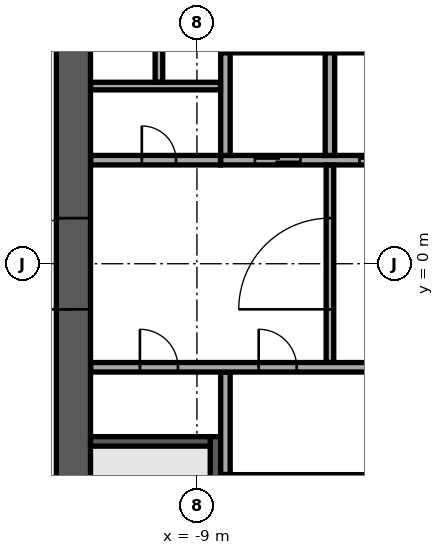
"""IFC4 building model, lengths in metres.
Left out: names, types, materials, properties, quantities, classifications, styles, units other than length and angle.
Written with IfcOpenShell. Run it as: python <this file> out.ifc"""

import sys

from ifc_helpers import new_model, si_unit, direction, frame, frame_2d, origin, place, context, subcontext, project, spatial, rectangle, extrude, element, fill, save


model = new_model("IFC4")
c1 = context("Model", 3, precision=1e-05, world=origin(), true_north=direction((0.0, 1.0)))
c2 = subcontext(c1, "Body", "Model", "MODEL_VIEW")
j1 = project(units=[si_unit("LENGTHUNIT", "METRE"), si_unit("PLANEANGLEUNIT", "RADIAN")], contexts=[c1])
p1 = place(None, origin())
s1 = spatial("IfcSite", under=j1, at=p1, CompositionType="ELEMENT")
p2 = place(p1, origin())
s2 = spatial("IfcBuilding", under=s1, at=p2, CompositionType="ELEMENT")
p3 = place(p2, frame((0.0, 0.0, 193.3)))
s3 = spatial("IfcBuildingStorey", under=s2, at=p3, CompositionType="ELEMENT", Elevation=193.3)
p4 = place(p3, frame((-12.25, -11.8, 0.0), z_axis=(0.0, 0.0, 1.0), x_axis=(0.0, 1.0, 0.0)))
e1 = element("IfcWall", 1, at=p4, inside=s3, PredefinedType="SHEAR", context=c2, shape_type="SweptSolid", body=[
    extrude(rectangle(XDim=23.6, YDim=0.9, at=frame_2d((11.8, 0.0))), origin(), (0.0, 0.0, 1.0), 3.62),
])
p5 = place(p4, frame((10.6, 0.0, 0.0)))
e2 = element("IfcOpeningElement", 2, at=p5, cuts=e1, PredefinedType="OPENING", context=c2, shape_type="SweptSolid", body=[
    extrude(rectangle(XDim=2.4, YDim=2.4, at=frame_2d((1.2, 1.2))), frame((0.0, 0.46, 0.0), z_axis=(0.0, -1.0, 0.0), x_axis=(1.0, 0.0, 0.0)), (0.0, 0.0, 1.0), 0.92),
])
p6 = place(p3, frame((-8.375, 5.7, 0.0), z_axis=(0.0, 0.0, 1.0), x_axis=(1.0, 0.0, 0.0)))
e3 = element("IfcWall", 3, at=p6, inside=s3, PredefinedType="SOLIDWALL", context=c2, shape_type="SweptSolid", body=[
    extrude(rectangle(XDim=16.75, YDim=0.3, at=frame_2d((8.375, 0.0))), origin(), (0.0, 0.0, 1.0), 3.62),
])
p7 = place(p3, frame((-8.375, 2.725, 0.0), z_axis=(0.0, 0.0, 1.0), x_axis=(1.0, 0.0, 0.0)))
e4 = element("IfcWall", 4, at=p7, inside=s3, PredefinedType="SOLIDWALL", context=c2, shape_type="SweptSolid", body=[
    extrude(rectangle(XDim=16.75, YDim=0.25, at=frame_2d((8.375, 0.0))), origin(), (0.0, 0.0, 1.0), 3.62),
])
p8 = place(p7, frame((0.9, 0.0, 0.0)))
e5 = element("IfcOpeningElement", 5, at=p8, cuts=e4, PredefinedType="OPENING", context=c2, shape_type="SweptSolid", body=[
    extrude(rectangle(XDim=1.2, YDim=2.1, at=frame_2d((0.6, 1.05))), frame((0.0, 0.135, 0.0), z_axis=(0.0, -1.0, 0.0), x_axis=(1.0, 0.0, 0.0)), (0.0, 0.0, 1.0), 0.27),
])
p9 = place(p7, frame((3.65, 0.0, 0.0)))
e6 = element("IfcOpeningElement", 6, at=p9, cuts=e4, PredefinedType="OPENING", context=c2, shape_type="SweptSolid", body=[
    extrude(rectangle(XDim=1.2, YDim=2.1, at=frame_2d((0.6, 1.05))), frame((0.0, 0.135, 0.0), z_axis=(0.0, -1.0, 0.0), x_axis=(1.0, 0.0, 0.0)), (0.0, 0.0, 1.0), 0.27),
])
p10 = place(p7, frame((6.4, 0.0, 0.0)))
e7 = element("IfcOpeningElement", 7, at=p10, cuts=e4, PredefinedType="OPENING", context=c2, shape_type="SweptSolid", body=[
    extrude(rectangle(XDim=1.2, YDim=2.1, at=frame_2d((0.6, 1.05))), frame((0.0, 0.135, 0.0), z_axis=(0.0, -1.0, 0.0), x_axis=(1.0, 0.0, 0.0)), (0.0, 0.0, 1.0), 0.27),
])
p11 = place(p7, frame((9.15, 0.0, 0.0)))
e8 = element("IfcOpeningElement", 8, at=p11, cuts=e4, PredefinedType="OPENING", context=c2, shape_type="SweptSolid", body=[
    extrude(rectangle(XDim=1.2, YDim=2.1, at=frame_2d((0.6, 1.05))), frame((0.0, 0.135, 0.0), z_axis=(0.0, -1.0, 0.0), x_axis=(1.0, 0.0, 0.0)), (0.0, 0.0, 1.0), 0.27),
])
p12 = place(p7, frame((11.9, 0.0, 0.0)))
e9 = element("IfcOpeningElement", 9, at=p12, cuts=e4, PredefinedType="OPENING", context=c2, shape_type="SweptSolid", body=[
    extrude(rectangle(XDim=1.2, YDim=2.1, at=frame_2d((0.6, 1.05))), frame((0.0, 0.135, 0.0), z_axis=(0.0, -1.0, 0.0), x_axis=(1.0, 0.0, 0.0)), (0.0, 0.0, 1.0), 0.27),
])
p13 = place(p7, frame((14.65, 0.0, 0.0)))
e10 = element("IfcOpeningElement", 10, at=p13, cuts=e4, PredefinedType="OPENING", context=c2, shape_type="SweptSolid", body=[
    extrude(rectangle(XDim=1.2, YDim=2.1, at=frame_2d((0.6, 1.05))), frame((0.0, 0.135, 0.0), z_axis=(0.0, -1.0, 0.0), x_axis=(1.0, 0.0, 0.0)), (0.0, 0.0, 1.0), 0.27),
])
for number, where, z_axis, x_axis in (
    (11, (-8.25, 2.85, 0.0), (0.0, 0.0, 1.0), (0.0, 1.0, 0.0)),
    (12, (-5.5, 2.85, 0.0), (0.0, 0.0, 1.0), (0.0, 1.0, 0.0)),
):
    element("IfcWall", number, at=place(p3, frame(where, z_axis=z_axis, x_axis=x_axis)), inside=s3, PredefinedType="SOLIDWALL", context=c2, shape_type="SweptSolid", body=[
        extrude(rectangle(XDim=2.7, YDim=0.25, at=frame_2d((1.35, 0.0))), origin(), (0.0, 0.0, 1.0), 3.62),
    ])
p14 = place(p3, frame((-8.512, -4.55, 0.0), z_axis=(0.0, 0.0, 1.0), x_axis=(0.0, -1.0, 0.0)))
e13 = element("IfcWall", 13, at=p14, inside=s3, PredefinedType="SOLIDWALL", context=c2, shape_type="SweptSolid", body=[
    extrude(rectangle(XDim=7.25, YDim=0.275, at=frame_2d((3.625, 0.0))), origin(), (0.0, 0.0, 1.0), 3.62),
])
p15 = place(p14, frame((6.0, 0.0, 0.0)))
e14 = element("IfcOpeningElement", 14, at=p15, cuts=e13, PredefinedType="OPENING", context=c2, shape_type="SweptSolid", body=[
    extrude(rectangle(XDim=1.0, YDim=2.1, at=frame_2d((0.5, 1.05))), frame((0.0, 0.147, 0.0), z_axis=(0.0, -1.0, 0.0), x_axis=(1.0, 0.0, 0.0)), (0.0, 0.0, 1.0), 0.295),
])
p16 = place(p3, frame((-8.65, -4.675, 0.0), z_axis=(0.0, 0.0, 1.0), x_axis=(-1.0, 0.0, 0.0)))
e15 = element("IfcWall", 15, at=p16, inside=s3, PredefinedType="SOLIDWALL", context=c2, shape_type="SweptSolid", body=[
    extrude(rectangle(XDim=3.15, YDim=0.25, at=frame_2d((1.575, 0.0))), origin(), (0.0, 0.0, 1.0), 3.62),
])
p17 = place(p3, frame((-8.35, -5.7, 0.0), z_axis=(0.0, 0.0, 1.0), x_axis=(1.0, 0.0, 0.0)))
e16 = element("IfcWall", 16, at=p17, inside=s3, PredefinedType="PARTITIONING", context=c2, shape_type="SweptSolid", body=[
    extrude(rectangle(XDim=5.47, YDim=0.3, at=frame_2d((2.735, 0.0))), origin(), (0.0, 0.0, 1.0), 3.62),
])
p18 = place(p3, frame((-8.25, -5.545, 0.0), z_axis=(0.0, 0.0, 1.0), x_axis=(0.0, 1.0, 0.0)))
e17 = element("IfcWall", 17, at=p18, inside=s3, PredefinedType="PARTITIONING", context=c2, shape_type="SweptSolid", body=[
    extrude(rectangle(XDim=2.69, YDim=0.25, at=frame_2d((1.345, 0.0))), origin(), (0.0, 0.0, 1.0), 3.62),
])
p19 = place(p3, frame((-11.795, -2.725, 0.0), z_axis=(0.0, 0.0, 1.0), x_axis=(1.0, 0.0, 0.0)))
e18 = element("IfcWall", 18, at=p19, inside=s3, PredefinedType="PARTITIONING", context=c2, shape_type="SweptSolid", body=[
    extrude(rectangle(XDim=8.915, YDim=0.25, at=frame_2d((4.458, 0.0))), origin(), (0.0, 0.0, 1.0), 3.62),
])
p20 = place(p19, frame((1.295, 0.0, 0.0)))
e19 = element("IfcOpeningElement", 19, at=p20, cuts=e18, PredefinedType="OPENING", context=c2, shape_type="SweptSolid", body=[
    extrude(rectangle(XDim=1.0, YDim=2.1, at=frame_2d((0.5, 1.05))), frame((0.0, 0.135, 0.0), z_axis=(0.0, -1.0, 0.0), x_axis=(1.0, 0.0, 0.0)), (0.0, 0.0, 1.0), 0.27),
])
p21 = place(p19, frame((4.42, 0.0, 0.0)))
e20 = element("IfcOpeningElement", 20, at=p21, cuts=e18, PredefinedType="OPENING", context=c2, shape_type="SweptSolid", body=[
    extrude(rectangle(XDim=1.0, YDim=2.1, at=frame_2d((0.5, 1.05))), frame((0.0, 0.135, 0.0), z_axis=(0.0, -1.0, 0.0), x_axis=(1.0, 0.0, 0.0)), (0.0, 0.0, 1.0), 0.27),
])
p22 = place(p3, frame((-5.5, -2.595, 0.0), z_axis=(0.0, 0.0, 1.0), x_axis=(0.0, 1.0, 0.0)))
e21 = element("IfcWall", 21, at=p22, inside=s3, PredefinedType="PARTITIONING", context=c2, shape_type="SweptSolid", body=[
    extrude(rectangle(XDim=5.19, YDim=0.2, at=frame_2d((2.595, 0.0))), origin(), (0.0, 0.0, 1.0), 3.62),
])
p23 = place(p22, frame((1.395, 0.0, 0.0)))
e22 = element("IfcOpeningElement", 22, at=p23, cuts=e21, PredefinedType="OPENING", context=c2, shape_type="SweptSolid", body=[
    extrude(rectangle(XDim=2.4, YDim=2.4, at=frame_2d((1.2, 1.2))), frame((0.0, 0.11, 0.0), z_axis=(0.0, -1.0, 0.0), x_axis=(1.0, 0.0, 0.0)), (0.0, 0.0, 1.0), 0.22),
])
p24 = place(p3, frame((-11.795, 2.725, 0.0), z_axis=(0.0, 0.0, 1.0), x_axis=(1.0, 0.0, 0.0)))
e23 = element("IfcWall", 23, at=p24, inside=s3, PredefinedType="PARTITIONING", context=c2, shape_type="SweptSolid", body=[
    extrude(rectangle(XDim=3.415, YDim=0.25, at=frame_2d((1.708, 0.0))), origin(), (0.0, 0.0, 1.0), 3.62),
])
p25 = place(p24, frame((1.345, 0.0, 0.0)))
e24 = element("IfcOpeningElement", 24, at=p25, cuts=e23, PredefinedType="OPENING", context=c2, shape_type="SweptSolid", body=[
    extrude(rectangle(XDim=0.9, YDim=2.1, at=frame_2d((0.45, 1.05))), frame((0.0, 0.135, 0.0), z_axis=(0.0, -1.0, 0.0), x_axis=(1.0, 0.0, 0.0)), (0.0, 0.0, 1.0), 0.27),
])
p26 = place(p3, frame((-11.795, 4.675, 0.0), z_axis=(0.0, 0.0, 1.0), x_axis=(1.0, 0.0, 0.0)))
e25 = element("IfcWall", 25, at=p26, inside=s3, PredefinedType="PARTITIONING", context=c2, shape_type="SweptSolid", body=[
    extrude(rectangle(XDim=3.415, YDim=0.2, at=frame_2d((1.708, 0.0))), origin(), (0.0, 0.0, 1.0), 3.62),
])
p27 = place(p3, frame((-10.0, 4.78, 0.0), z_axis=(0.0, 0.0, 1.0), x_axis=(0.0, 1.0, 0.0)))
e26 = element("IfcWall", 26, at=p27, inside=s3, PredefinedType="PARTITIONING", context=c2, shape_type="SweptSolid", body=[
    extrude(rectangle(XDim=7.015, YDim=0.2, at=frame_2d((3.507, 0.0))), origin(), (0.0, 0.0, 1.0), 3.62),
])
p28 = place(p27, frame((2.92, 0.0, 0.0)))
e27 = element("IfcOpeningElement", 27, at=p28, cuts=e26, PredefinedType="OPENING", context=c2, shape_type="SweptSolid", body=[
    extrude(rectangle(XDim=1.0, YDim=2.1, at=frame_2d((0.5, 1.05))), frame((0.0, 0.11, 0.0), z_axis=(0.0, -1.0, 0.0), x_axis=(1.0, 0.0, 0.0)), (0.0, 0.0, 1.0), 0.22),
])
p29 = place(p3, frame((2.286, 34.715, 0.0), z_axis=(0.0, 0.0, 1.0), x_axis=(-0.754708272811, -0.656060532993, 0.0)))
e28 = element("IfcWall", 28, at=p29, inside=s3, PredefinedType="STANDARD", context=c2, shape_type="SweptSolid", body=[
    extrude(rectangle(XDim=49.0, YDim=0.6, at=frame_2d((24.5, 0.0))), origin(), (0.0, 0.0, 1.0), 3.62),
])
p30 = place(p29, frame((1.227, 0.0, 0.9)))
e29 = element("IfcOpeningElement", 29, at=p30, cuts=e28, PredefinedType="OPENING", context=c2, shape_type="SweptSolid", body=[
    extrude(rectangle(XDim=2.0, YDim=2.1, at=frame_2d((1.0, 1.05))), frame((0.0, 0.31, 0.0), z_axis=(0.0, -1.0, 0.0), x_axis=(1.0, 0.0, 0.0)), (0.0, 0.0, 1.0), 0.62),
])
p31 = place(p29, frame((5.682, 0.0, 0.9)))
e30 = element("IfcOpeningElement", 30, at=p31, cuts=e28, PredefinedType="OPENING", context=c2, shape_type="SweptSolid", body=[
    extrude(rectangle(XDim=2.0, YDim=2.1, at=frame_2d((1.0, 1.05))), frame((0.0, 0.31, 0.0), z_axis=(0.0, -1.0, 0.0), x_axis=(1.0, 0.0, 0.0)), (0.0, 0.0, 1.0), 0.62),
])
p32 = place(p29, frame((10.136, 0.0, 0.9)))
e31 = element("IfcOpeningElement", 31, at=p32, cuts=e28, PredefinedType="OPENING", context=c2, shape_type="SweptSolid", body=[
    extrude(rectangle(XDim=2.0, YDim=2.1, at=frame_2d((1.0, 1.05))), frame((0.0, 0.31, 0.0), z_axis=(0.0, -1.0, 0.0), x_axis=(1.0, 0.0, 0.0)), (0.0, 0.0, 1.0), 0.62),
])
p33 = place(p29, frame((14.591, 0.0, 0.9)))
e32 = element("IfcOpeningElement", 32, at=p33, cuts=e28, PredefinedType="OPENING", context=c2, shape_type="SweptSolid", body=[
    extrude(rectangle(XDim=2.0, YDim=2.1, at=frame_2d((1.0, 1.05))), frame((0.0, 0.31, 0.0), z_axis=(0.0, -1.0, 0.0), x_axis=(1.0, 0.0, 0.0)), (0.0, 0.0, 1.0), 0.62),
])
p34 = place(p29, frame((19.045, 0.0, 0.9)))
e33 = element("IfcOpeningElement", 33, at=p34, cuts=e28, PredefinedType="OPENING", context=c2, shape_type="SweptSolid", body=[
    extrude(rectangle(XDim=2.0, YDim=2.1, at=frame_2d((1.0, 1.05))), frame((0.0, 0.31, 0.0), z_axis=(0.0, -1.0, 0.0), x_axis=(1.0, 0.0, 0.0)), (0.0, 0.0, 1.0), 0.62),
])
p35 = place(p29, frame((23.5, 0.0, 0.9)))
e34 = element("IfcOpeningElement", 34, at=p35, cuts=e28, PredefinedType="OPENING", context=c2, shape_type="SweptSolid", body=[
    extrude(rectangle(XDim=2.0, YDim=2.1, at=frame_2d((1.0, 1.05))), frame((0.0, 0.31, 0.0), z_axis=(0.0, -1.0, 0.0), x_axis=(1.0, 0.0, 0.0)), (0.0, 0.0, 1.0), 0.62),
])
p36 = place(p29, frame((27.955, 0.0, 0.9)))
e35 = element("IfcOpeningElement", 35, at=p36, cuts=e28, PredefinedType="OPENING", context=c2, shape_type="SweptSolid", body=[
    extrude(rectangle(XDim=2.0, YDim=2.1, at=frame_2d((1.0, 1.05))), frame((0.0, 0.31, 0.0), z_axis=(0.0, -1.0, 0.0), x_axis=(1.0, 0.0, 0.0)), (0.0, 0.0, 1.0), 0.62),
])
p37 = place(p29, frame((32.409, 0.0, 0.9)))
e36 = element("IfcOpeningElement", 36, at=p37, cuts=e28, PredefinedType="OPENING", context=c2, shape_type="SweptSolid", body=[
    extrude(rectangle(XDim=2.0, YDim=2.1, at=frame_2d((1.0, 1.05))), frame((0.0, 0.31, 0.0), z_axis=(0.0, -1.0, 0.0), x_axis=(1.0, 0.0, 0.0)), (0.0, 0.0, 1.0), 0.62),
])
p38 = place(p29, frame((36.864, 0.0, 0.9)))
e37 = element("IfcOpeningElement", 37, at=p38, cuts=e28, PredefinedType="OPENING", context=c2, shape_type="SweptSolid", body=[
    extrude(rectangle(XDim=2.0, YDim=2.1, at=frame_2d((1.0, 1.05))), frame((0.0, 0.31, 0.0), z_axis=(0.0, -1.0, 0.0), x_axis=(1.0, 0.0, 0.0)), (0.0, 0.0, 1.0), 0.62),
])
p39 = place(p29, frame((41.318, 0.0, 0.9)))
e38 = element("IfcOpeningElement", 38, at=p39, cuts=e28, PredefinedType="OPENING", context=c2, shape_type="SweptSolid", body=[
    extrude(rectangle(XDim=2.0, YDim=2.1, at=frame_2d((1.0, 1.05))), frame((0.0, 0.31, 0.0), z_axis=(0.0, -1.0, 0.0), x_axis=(1.0, 0.0, 0.0)), (0.0, 0.0, 1.0), 0.62),
])
p40 = place(p29, frame((45.773, 0.0, 0.9)))
e39 = element("IfcOpeningElement", 39, at=p40, cuts=e28, PredefinedType="OPENING", context=c2, shape_type="SweptSolid", body=[
    extrude(rectangle(XDim=2.0, YDim=2.1, at=frame_2d((1.0, 1.05))), frame((0.0, 0.31, 0.0), z_axis=(0.0, -1.0, 0.0), x_axis=(1.0, 0.0, 0.0)), (0.0, 0.0, 1.0), 0.62),
])
p41 = place(p3, frame((-35.208, -4.768, 0.0), z_axis=(0.0, 0.0, 1.0), x_axis=(0.656058749455, -0.754709823219, 0.0)))
e40 = element("IfcWall", 40, at=p41, inside=s3, PredefinedType="STANDARD", context=c2, shape_type="SweptSolid", body=[
    extrude(rectangle(XDim=39.0, YDim=0.6, at=frame_2d((19.5, 0.0))), origin(), (0.0, 0.0, 1.0), 3.62),
])
p42 = place(p41, frame((1.217, 0.0, 0.9)))
e41 = element("IfcOpeningElement", 41, at=p42, cuts=e40, PredefinedType="OPENING", context=c2, shape_type="SweptSolid", body=[
    extrude(rectangle(XDim=1.9, YDim=2.1, at=frame_2d((0.95, 1.05))), frame((0.0, 0.31, 0.0), z_axis=(0.0, -1.0, 0.0), x_axis=(1.0, 0.0, 0.0)), (0.0, 0.0, 1.0), 0.62),
])
p43 = place(p41, frame((5.55, 0.0, 0.9)))
e42 = element("IfcOpeningElement", 42, at=p43, cuts=e40, PredefinedType="OPENING", context=c2, shape_type="SweptSolid", body=[
    extrude(rectangle(XDim=1.9, YDim=2.1, at=frame_2d((0.95, 1.05))), frame((0.0, 0.31, 0.0), z_axis=(0.0, -1.0, 0.0), x_axis=(1.0, 0.0, 0.0)), (0.0, 0.0, 1.0), 0.62),
])
p44 = place(p41, frame((9.883, 0.0, 0.9)))
e43 = element("IfcOpeningElement", 43, at=p44, cuts=e40, PredefinedType="OPENING", context=c2, shape_type="SweptSolid", body=[
    extrude(rectangle(XDim=1.9, YDim=2.1, at=frame_2d((0.95, 1.05))), frame((0.0, 0.31, 0.0), z_axis=(0.0, -1.0, 0.0), x_axis=(1.0, 0.0, 0.0)), (0.0, 0.0, 1.0), 0.62),
])
p45 = place(p41, frame((14.217, 0.0, 0.9)))
e44 = element("IfcOpeningElement", 44, at=p45, cuts=e40, PredefinedType="OPENING", context=c2, shape_type="SweptSolid", body=[
    extrude(rectangle(XDim=1.9, YDim=2.1, at=frame_2d((0.95, 1.05))), frame((0.0, 0.31, 0.0), z_axis=(0.0, -1.0, 0.0), x_axis=(1.0, 0.0, 0.0)), (0.0, 0.0, 1.0), 0.62),
])
p46 = place(p41, frame((18.55, 0.0, 0.9)))
e45 = element("IfcOpeningElement", 45, at=p46, cuts=e40, PredefinedType="OPENING", context=c2, shape_type="SweptSolid", body=[
    extrude(rectangle(XDim=1.9, YDim=2.1, at=frame_2d((0.95, 1.05))), frame((0.0, 0.31, 0.0), z_axis=(0.0, -1.0, 0.0), x_axis=(1.0, 0.0, 0.0)), (0.0, 0.0, 1.0), 0.62),
])
p47 = place(p41, frame((22.883, 0.0, 0.9)))
e46 = element("IfcOpeningElement", 46, at=p47, cuts=e40, PredefinedType="OPENING", context=c2, shape_type="SweptSolid", body=[
    extrude(rectangle(XDim=1.9, YDim=2.1, at=frame_2d((0.95, 1.05))), frame((0.0, 0.31, 0.0), z_axis=(0.0, -1.0, 0.0), x_axis=(1.0, 0.0, 0.0)), (0.0, 0.0, 1.0), 0.62),
])
p48 = place(p41, frame((27.217, 0.0, 0.9)))
e47 = element("IfcOpeningElement", 47, at=p48, cuts=e40, PredefinedType="OPENING", context=c2, shape_type="SweptSolid", body=[
    extrude(rectangle(XDim=1.9, YDim=2.1, at=frame_2d((0.95, 1.05))), frame((0.0, 0.31, 0.0), z_axis=(0.0, -1.0, 0.0), x_axis=(1.0, 0.0, 0.0)), (0.0, 0.0, 1.0), 0.62),
])
p49 = place(p41, frame((31.55, 0.0, 0.9)))
e48 = element("IfcOpeningElement", 48, at=p49, cuts=e40, PredefinedType="OPENING", context=c2, shape_type="SweptSolid", body=[
    extrude(rectangle(XDim=1.9, YDim=2.1, at=frame_2d((0.95, 1.05))), frame((0.0, 0.31, 0.0), z_axis=(0.0, -1.0, 0.0), x_axis=(1.0, 0.0, 0.0)), (0.0, 0.0, 1.0), 0.62),
])
p50 = place(p41, frame((35.883, 0.0, 0.9)))
e49 = element("IfcOpeningElement", 49, at=p50, cuts=e40, PredefinedType="OPENING", context=c2, shape_type="SweptSolid", body=[
    extrude(rectangle(XDim=1.9, YDim=2.1, at=frame_2d((0.95, 1.05))), frame((0.0, 0.31, 0.0), z_axis=(0.0, -1.0, 0.0), x_axis=(1.0, 0.0, 0.0)), (0.0, 0.0, 1.0), 0.62),
])
p51 = place(p3, frame((-26.208, 2.616, 0.0), z_axis=(0.0, 0.0, 1.0), x_axis=(0.754710701231, 0.656057739416, 0.0)))
e50 = element("IfcWall", 50, at=p51, inside=s3, PredefinedType="PARTITIONING", context=c2, shape_type="SweptSolid", body=[
    extrude(rectangle(XDim=36.126, YDim=0.15, at=frame_2d((18.063, 0.0))), origin(), (0.0, 0.0, 1.0), 3.17),
])
p52 = place(p51, frame((2.551, 0.0, 0.0)))
e51 = element("IfcOpeningElement", 51, at=p52, cuts=e50, PredefinedType="OPENING", context=c2, shape_type="SweptSolid", body=[
    extrude(rectangle(XDim=1.0, YDim=2.1, at=frame_2d((0.5, 1.05))), frame((0.0, 0.085, 0.0), z_axis=(0.0, -1.0, 0.0), x_axis=(1.0, 0.0, 0.0)), (0.0, 0.0, 1.0), 0.17),
])
p53 = place(p51, frame((15.362, 0.0, 0.0)))
e52 = element("IfcOpeningElement", 52, at=p53, cuts=e50, PredefinedType="OPENING", context=c2, shape_type="SweptSolid", body=[
    extrude(rectangle(XDim=1.0, YDim=2.1, at=frame_2d((0.5, 1.05))), frame((0.0, 0.085, 0.0), z_axis=(0.0, -1.0, 0.0), x_axis=(1.0, 0.0, 0.0)), (0.0, 0.0, 1.0), 0.17),
])
p54 = place(p51, frame((25.542, 0.0, 0.0)))
e53 = element("IfcOpeningElement", 53, at=p54, cuts=e50, PredefinedType="OPENING", context=c2, shape_type="SweptSolid", body=[
    extrude(rectangle(XDim=1.8, YDim=2.1, at=frame_2d((0.9, 1.05))), frame((0.0, 0.085, 0.0), z_axis=(0.0, -1.0, 0.0), x_axis=(1.0, 0.0, 0.0)), (0.0, 0.0, 1.0), 0.17),
])
p55 = place(p3, frame((-24.98, -4.673, 0.0), z_axis=(0.0, 0.0, 1.0), x_axis=(0.656048444225, -0.754718781289, 0.0)))
e54 = element("IfcWall", 54, at=p55, inside=s3, PredefinedType="PARTITIONING", context=c2, shape_type="SweptSolid", body=[
    extrude(rectangle(XDim=25.8, YDim=0.15, at=frame_2d((12.9, 0.0))), origin(), (0.0, 0.0, 1.0), 3.17),
])
p56 = place(p55, frame((12.071, 0.0, 0.0)))
e55 = element("IfcOpeningElement", 55, at=p56, cuts=e54, PredefinedType="OPENING", context=c2, shape_type="SweptSolid", body=[
    extrude(rectangle(XDim=1.0, YDim=2.1, at=frame_2d((0.5, 1.05))), frame((0.0, 0.085, 0.0), z_axis=(0.0, -1.0, 0.0), x_axis=(1.0, 0.0, 0.0)), (0.0, 0.0, 1.0), 0.17),
])
p57 = place(p55, frame((24.318, 0.0, 0.0)))
e56 = element("IfcOpeningElement", 56, at=p57, cuts=e54, PredefinedType="OPENING", context=c2, shape_type="SweptSolid", body=[
    extrude(rectangle(XDim=1.0, YDim=2.1, at=frame_2d((0.5, 1.05))), frame((0.0, 0.085, 0.0), z_axis=(0.0, -1.0, 0.0), x_axis=(1.0, 0.0, 0.0)), (0.0, 0.0, 1.0), 0.17),
])
p58 = place(p5, origin())
e57 = element("IfcDoor", 57, at=p58, inside=s3, OperationType="SINGLE_SWING_LEFT", PredefinedType="DOOR", context=c2, shape_type="SweptSolid", body=[
    extrude(rectangle(XDim=2.4, YDim=2.4, at=frame_2d((1.2, 1.2))), frame((0.0, 0.025, 0.0), z_axis=(0.0, -1.0, 0.0), x_axis=(1.0, 0.0, 0.0)), (0.0, 0.0, 1.0), 0.05),
])
fill(e2, e57)
p59 = place(p8, origin())
e58 = element("IfcDoor", 58, at=p59, inside=s3, OperationType="DOUBLE_DOOR_SLIDING", PredefinedType="DOOR", context=c2, shape_type="SweptSolid", body=[
    extrude(rectangle(XDim=1.2, YDim=2.1, at=frame_2d((0.6, 1.05))), frame((0.0, 0.025, 0.0), z_axis=(0.0, -1.0, 0.0), x_axis=(1.0, 0.0, 0.0)), (0.0, 0.0, 1.0), 0.05),
])
fill(e5, e58)
p60 = place(p9, origin())
e59 = element("IfcDoor", 59, at=p60, inside=s3, OperationType="DOUBLE_DOOR_SLIDING", PredefinedType="DOOR", context=c2, shape_type="SweptSolid", body=[
    extrude(rectangle(XDim=1.2, YDim=2.1, at=frame_2d((0.6, 1.05))), frame((0.0, 0.025, 0.0), z_axis=(0.0, -1.0, 0.0), x_axis=(1.0, 0.0, 0.0)), (0.0, 0.0, 1.0), 0.05),
])
fill(e6, e59)
p61 = place(p20, origin())
e60 = element("IfcDoor", 60, at=p61, inside=s3, OperationType="SINGLE_SWING_RIGHT", PredefinedType="DOOR", context=c2, shape_type="SweptSolid", body=[
    extrude(rectangle(XDim=1.0, YDim=2.1, at=frame_2d((0.5, 1.05))), frame((0.0, 0.025, 0.0), z_axis=(0.0, -1.0, 0.0), x_axis=(1.0, 0.0, 0.0)), (0.0, 0.0, 1.0), 0.05),
])
fill(e19, e60)
p62 = place(p25, origin())
e61 = element("IfcDoor", 61, at=p62, inside=s3, OperationType="SINGLE_SWING_RIGHT", PredefinedType="DOOR", context=c2, shape_type="SweptSolid", body=[
    extrude(rectangle(XDim=0.9, YDim=2.1, at=frame_2d((0.45, 1.05))), frame((0.0, 0.025, 0.0), z_axis=(0.0, -1.0, 0.0), x_axis=(1.0, 0.0, 0.0)), (0.0, 0.0, 1.0), 0.05),
])
fill(e24, e61)
p63 = place(p21, origin())
e62 = element("IfcDoor", 62, at=p63, inside=s3, OperationType="SINGLE_SWING_RIGHT", PredefinedType="DOOR", context=c2, shape_type="SweptSolid", body=[
    extrude(rectangle(XDim=1.0, YDim=2.1, at=frame_2d((0.5, 1.05))), frame((0.0, 0.025, 0.0), z_axis=(0.0, -1.0, 0.0), x_axis=(1.0, 0.0, 0.0)), (0.0, 0.0, 1.0), 0.05),
])
fill(e20, e62)
p64 = place(p23, origin())
e63 = element("IfcDoor", 63, at=p64, inside=s3, OperationType="DOUBLE_DOOR_DOUBLE_SWING", PredefinedType="DOOR", context=c2, shape_type="SweptSolid", body=[
    extrude(rectangle(XDim=2.4, YDim=2.4, at=frame_2d((1.2, 1.2))), frame((0.0, 0.025, 0.0), z_axis=(0.0, -1.0, 0.0), x_axis=(1.0, 0.0, 0.0)), (0.0, 0.0, 1.0), 0.05),
])
fill(e22, e63)
save(model, sys.argv[1])
